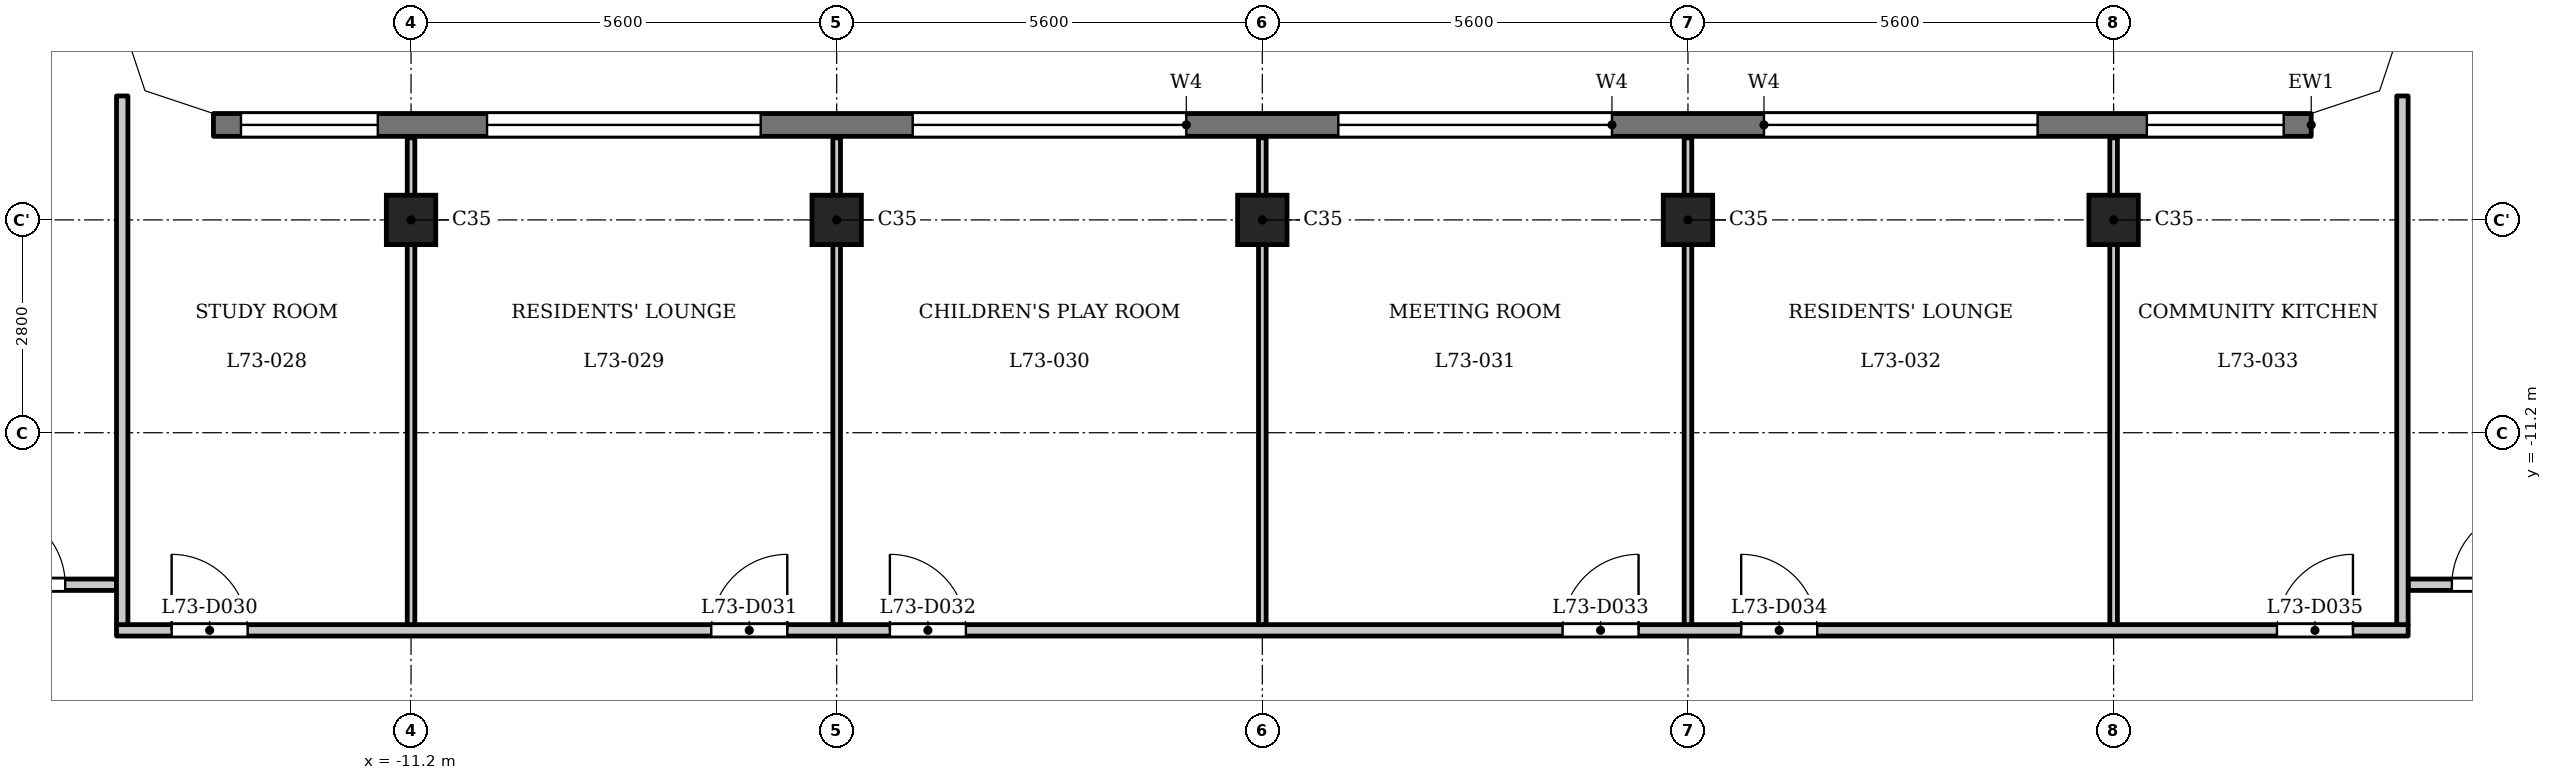
"""IFC4 building model, lengths in metres.
Left out: names, types, materials, properties, quantities, classifications, styles, units other than length and angle.
Written with IfcOpenShell. Run it as: python <this file> out.ifc"""

import sys

from ifc_helpers import new_model, si_unit, direction, frame, frame_2d, origin, origin_2d, place, context, subcontext, project, spatial, polyline, rectangle, outline, extrude, element, fill, save


model = new_model("IFC4")
c1 = context("Model", 3, precision=1e-05, world=origin(), true_north=direction((0.0, 1.0)))
c2 = subcontext(c1, "Body", "Model", "MODEL_VIEW")
j1 = project(units=[si_unit("LENGTHUNIT", "METRE"), si_unit("PLANEANGLEUNIT", "RADIAN")], contexts=[c1])
p1 = place(None, origin())
s1 = spatial("IfcSite", under=j1, at=p1, CompositionType="ELEMENT")
p2 = place(p1, origin())
s2 = spatial("IfcBuilding", under=s1, at=p2, CompositionType="ELEMENT")
p3 = place(p2, frame((0.0, 0.0, 280.2)))
s3 = spatial("IfcBuildingStorey", under=s2, at=p3, CompositionType="ELEMENT", Elevation=280.2)
for number, where, z_axis, x_axis in (
    (1, (-11.2, -8.4, 0.0), (0.0, 0.0, 1.0), (1.0, 0.0, 0.0)),
    (2, (-5.6, -8.4, 0.0), (0.0, 0.0, 1.0), (1.0, 0.0, 0.0)),
    (3, (0.0, -8.4, 0.0), (0.0, 0.0, 1.0), (1.0, 0.0, 0.0)),
    (4, (5.6, -8.4, 0.0), (0.0, 0.0, 1.0), (1.0, 0.0, 0.0)),
    (5, (11.2, -8.4, 0.0), (0.0, 0.0, 1.0), (1.0, 0.0, 0.0)),
):
    element("IfcColumn", number, at=place(p3, frame(where, z_axis=z_axis, x_axis=x_axis)), inside=s3, PredefinedType="COLUMN", context=c2, shape_type="SweptSolid", body=[
        extrude(rectangle(XDim=0.65, YDim=0.65, at=origin_2d()), origin(), (0.0, 0.0, 1.0), 3.5),
    ])
p4 = place(p3, frame((13.8, -7.15, 0.0), z_axis=(0.0, 0.0, 1.0), x_axis=(-1.0, 0.0, 0.0)))
e6 = element("IfcWall", 6, at=p4, inside=s3, PredefinedType="SOLIDWALL", context=c2, shape_type="SweptSolid", body=[
    extrude(rectangle(XDim=27.6, YDim=0.3, at=frame_2d((13.8, 0.0))), origin(), (0.0, 0.0, 1.0), 3.15),
])
p5 = place(p4, frame((0.363, 0.0, 0.9)))
e7 = element("IfcOpeningElement", 7, at=p5, cuts=e6, PredefinedType="OPENING", context=c2, shape_type="SweptSolid", body=[
    extrude(rectangle(XDim=1.8, YDim=1.25, at=frame_2d((0.9, 0.625))), frame((0.0, 0.16, 0.0), z_axis=(0.0, -1.0, 0.0), x_axis=(1.0, 0.0, 0.0)), (0.0, 0.0, 1.0), 0.32),
])
p6 = place(p4, frame((3.6, 0.0, 1.2)))
e8 = element("IfcOpeningElement", 8, at=p6, cuts=e6, PredefinedType="OPENING", context=c2, shape_type="SweptSolid", body=[
    extrude(rectangle(XDim=3.6, YDim=0.95, at=frame_2d((1.8, 0.475))), frame((0.0, 0.16, 0.0), z_axis=(0.0, -1.0, 0.0), x_axis=(1.0, 0.0, 0.0)), (0.0, 0.0, 1.0), 0.32),
])
p7 = place(p4, frame((9.2, 0.0, 1.2)))
e9 = element("IfcOpeningElement", 9, at=p7, cuts=e6, PredefinedType="OPENING", context=c2, shape_type="SweptSolid", body=[
    extrude(rectangle(XDim=3.6, YDim=0.95, at=frame_2d((1.8, 0.475))), frame((0.0, 0.16, 0.0), z_axis=(0.0, -1.0, 0.0), x_axis=(1.0, 0.0, 0.0)), (0.0, 0.0, 1.0), 0.32),
])
p8 = place(p4, frame((14.8, 0.0, 1.2)))
e10 = element("IfcOpeningElement", 10, at=p8, cuts=e6, PredefinedType="OPENING", context=c2, shape_type="SweptSolid", body=[
    extrude(rectangle(XDim=3.6, YDim=0.95, at=frame_2d((1.8, 0.475))), frame((0.0, 0.16, 0.0), z_axis=(0.0, -1.0, 0.0), x_axis=(1.0, 0.0, 0.0)), (0.0, 0.0, 1.0), 0.32),
])
p9 = place(p4, frame((20.4, 0.0, 1.2)))
e11 = element("IfcOpeningElement", 11, at=p9, cuts=e6, PredefinedType="OPENING", context=c2, shape_type="SweptSolid", body=[
    extrude(rectangle(XDim=3.6, YDim=0.95, at=frame_2d((1.8, 0.475))), frame((0.0, 0.16, 0.0), z_axis=(0.0, -1.0, 0.0), x_axis=(1.0, 0.0, 0.0)), (0.0, 0.0, 1.0), 0.32),
])
p10 = place(p4, frame((25.438, 0.0, 0.9)))
e12 = element("IfcOpeningElement", 12, at=p10, cuts=e6, PredefinedType="OPENING", context=c2, shape_type="SweptSolid", body=[
    extrude(rectangle(XDim=1.8, YDim=1.25, at=frame_2d((0.9, 0.625))), frame((0.0, 0.16, 0.0), z_axis=(0.0, -1.0, 0.0), x_axis=(1.0, 0.0, 0.0)), (0.0, 0.0, 1.0), 0.32),
])
p11 = place(p3, frame((-15.075, -13.8, 0.0), z_axis=(0.0, 0.0, 1.0), x_axis=(1.0, 0.0, 0.0)))
e13 = element("IfcWall", 13, at=p11, inside=s3, PredefinedType="PARTITIONING", context=c2, shape_type="SweptSolid", body=[
    extrude(rectangle(XDim=30.15, YDim=0.15, at=frame_2d((15.075, 0.0))), origin(), (0.0, 0.0, 1.0), 3.15),
])
p12 = place(p11, frame((0.725, 0.0, 0.0)))
e14 = element("IfcOpeningElement", 14, at=p12, cuts=e13, PredefinedType="OPENING", context=c2, shape_type="SweptSolid", body=[
    extrude(rectangle(XDim=1.0, YDim=2.1, at=frame_2d((0.5, 1.05))), frame((0.0, 0.085, 0.0), z_axis=(0.0, -1.0, 0.0), x_axis=(1.0, 0.0, 0.0)), (0.0, 0.0, 1.0), 0.17),
])
p13 = place(p11, frame((7.825, 0.0, 0.0)))
e15 = element("IfcOpeningElement", 15, at=p13, cuts=e13, PredefinedType="OPENING", context=c2, shape_type="SweptSolid", body=[
    extrude(rectangle(XDim=1.0, YDim=2.1, at=frame_2d((0.5, 1.05))), frame((0.0, 0.085, 0.0), z_axis=(0.0, -1.0, 0.0), x_axis=(1.0, 0.0, 0.0)), (0.0, 0.0, 1.0), 0.17),
])
p14 = place(p11, frame((10.175, 0.0, 0.0)))
e16 = element("IfcOpeningElement", 16, at=p14, cuts=e13, PredefinedType="OPENING", context=c2, shape_type="SweptSolid", body=[
    extrude(rectangle(XDim=1.0, YDim=2.1, at=frame_2d((0.5, 1.05))), frame((0.0, 0.085, 0.0), z_axis=(0.0, -1.0, 0.0), x_axis=(1.0, 0.0, 0.0)), (0.0, 0.0, 1.0), 0.17),
])
p15 = place(p11, frame((19.025, 0.0, 0.0)))
e17 = element("IfcOpeningElement", 17, at=p15, cuts=e13, PredefinedType="OPENING", context=c2, shape_type="SweptSolid", body=[
    extrude(rectangle(XDim=1.0, YDim=2.1, at=frame_2d((0.5, 1.05))), frame((0.0, 0.085, 0.0), z_axis=(0.0, -1.0, 0.0), x_axis=(1.0, 0.0, 0.0)), (0.0, 0.0, 1.0), 0.17),
])
p16 = place(p11, frame((21.375, 0.0, 0.0)))
e18 = element("IfcOpeningElement", 18, at=p16, cuts=e13, PredefinedType="OPENING", context=c2, shape_type="SweptSolid", body=[
    extrude(rectangle(XDim=1.0, YDim=2.1, at=frame_2d((0.5, 1.05))), frame((0.0, 0.085, 0.0), z_axis=(0.0, -1.0, 0.0), x_axis=(1.0, 0.0, 0.0)), (0.0, 0.0, 1.0), 0.17),
])
p17 = place(p11, frame((28.424, 0.0, 0.0)))
e19 = element("IfcOpeningElement", 19, at=p17, cuts=e13, PredefinedType="OPENING", context=c2, shape_type="SweptSolid", body=[
    extrude(rectangle(XDim=1.0, YDim=2.1, at=frame_2d((0.5, 1.05))), frame((0.0, 0.085, 0.0), z_axis=(0.0, -1.0, 0.0), x_axis=(1.0, 0.0, 0.0)), (0.0, 0.0, 1.0), 0.17),
])
p18 = place(p3, frame((-17.4, -13.2, 0.0), z_axis=(0.0, 0.0, 1.0), x_axis=(1.0, 0.0, 0.0)))
e20 = element("IfcWall", 20, at=p18, inside=s3, PredefinedType="PARTITIONING", context=c2, shape_type="SweptSolid", body=[
    extrude(rectangle(XDim=2.325, YDim=0.15, at=frame_2d((1.163, 0.0))), origin(), (0.0, 0.0, 1.0), 3.15),
])
p19 = place(p18, frame((0.65, 0.0, 0.0)))
e21 = element("IfcOpeningElement", 21, at=p19, cuts=e20, PredefinedType="OPENING", context=c2, shape_type="SweptSolid", body=[
    extrude(rectangle(XDim=1.0, YDim=2.1, at=frame_2d((0.5, 1.05))), frame((0.0, 0.085, 0.0), z_axis=(0.0, -1.0, 0.0), x_axis=(1.0, 0.0, 0.0)), (0.0, 0.0, 1.0), 0.17),
])
p20 = place(p3, frame((15.075, -13.2, 0.0), z_axis=(0.0, 0.0, 1.0), x_axis=(1.0, 0.0, 0.0)))
e22 = element("IfcWall", 22, at=p20, inside=s3, PredefinedType="PARTITIONING", context=c2, shape_type="SweptSolid", body=[
    extrude(rectangle(XDim=2.325, YDim=0.15, at=frame_2d((1.163, 0.0))), origin(), (0.0, 0.0, 1.0), 3.15),
])
p21 = place(p20, frame((0.575, 0.0, 0.0)))
e23 = element("IfcOpeningElement", 23, at=p21, cuts=e22, PredefinedType="OPENING", context=c2, shape_type="SweptSolid", body=[
    extrude(rectangle(XDim=1.0, YDim=2.1, at=frame_2d((0.5, 1.05))), frame((0.0, 0.085, 0.0), z_axis=(0.0, -1.0, 0.0), x_axis=(1.0, 0.0, 0.0)), (0.0, 0.0, 1.0), 0.17),
])
p22 = place(p3, frame((-15.0, -13.725, 0.0), z_axis=(0.0, 0.0, 1.0), x_axis=(0.0, 1.0, 0.0)))
e24 = element("IfcWall", 24, at=p22, inside=s3, PredefinedType="PARTITIONING", context=c2, shape_type="SweptSolid", body=[
    extrude(rectangle(XDim=6.956, YDim=0.15, at=frame_2d((3.478, 0.0))), origin(), (0.0, 0.0, 1.0), 3.15),
])
for number, where, z_axis, x_axis in (
    (25, (-11.2, -13.725, 0.0), (0.0, 0.0, 1.0), (0.0, 1.0, 0.0)),
    (26, (-5.6, -13.725, 0.0), (0.0, 0.0, 1.0), (0.0, 1.0, 0.0)),
    (27, (0.0, -13.725, 0.0), (0.0, 0.0, 1.0), (0.0, 1.0, 0.0)),
    (28, (5.6, -13.725, 0.0), (0.0, 0.0, 1.0), (0.0, 1.0, 0.0)),
    (29, (11.2, -13.725, 0.0), (0.0, 0.0, 1.0), (0.0, 1.0, 0.0)),
):
    element("IfcWall", number, at=place(p3, frame(where, z_axis=z_axis, x_axis=x_axis)), inside=s3, PredefinedType="PARTITIONING", context=c2, shape_type="SweptSolid", body=[
        extrude(rectangle(XDim=6.405, YDim=0.1, at=frame_2d((3.203, 0.0))), origin(), (0.0, 0.0, 1.0), 3.15),
    ])
p23 = place(p3, frame((15.0, -13.725, 0.0), z_axis=(0.0, 0.0, 1.0), x_axis=(0.0, 1.0, 0.0)))
e30 = element("IfcWall", 30, at=p23, inside=s3, PredefinedType="PARTITIONING", context=c2, shape_type="SweptSolid", body=[
    extrude(rectangle(XDim=6.956, YDim=0.15, at=frame_2d((3.478, 0.0))), origin(), (0.0, 0.0, 1.0), 3.15),
])
p24 = place(p3, origin())
e31 = element("IfcWall", 31, at=p24, inside=s3, PredefinedType="SOLIDWALL", context=c2, shape_type="SweptSolid", body=[
    extrude(outline(polyline([(14.937, -6.937), (15.3, -5.849), (15.3, -5.8), (15.0, -5.8), (14.7, -6.7), (13.8, -7.0), (13.8, -7.3), (13.849, -7.3), (14.937, -6.937)])), origin(), (0.0, 0.0, 1.0), 3.15),
])
e32 = element("IfcWall", 32, at=p24, inside=s3, PredefinedType="SOLIDWALL", context=c2, shape_type="SweptSolid", body=[
    extrude(outline(polyline([(-14.937, -6.937), (-13.849, -7.3), (-13.8, -7.3), (-13.8, -7.0), (-14.7, -6.7), (-15.0, -5.8), (-15.3, -5.8), (-15.3, -5.849), (-14.937, -6.937)])), origin(), (0.0, 0.0, 1.0), 3.15),
])
p25 = place(p19, origin())
e33 = element("IfcDoor", 33, at=p25, inside=s3, OperationType="SINGLE_SWING_RIGHT", PredefinedType="DOOR", context=c2, shape_type="SweptSolid", body=[
    extrude(rectangle(XDim=1.0, YDim=2.1, at=frame_2d((0.5, 1.05))), frame((0.0, 0.025, 0.0), z_axis=(0.0, -1.0, 0.0), x_axis=(1.0, 0.0, 0.0)), (0.0, 0.0, 1.0), 0.05),
])
fill(e21, e33)
p26 = place(p21, origin())
e34 = element("IfcDoor", 34, at=p26, inside=s3, OperationType="SINGLE_SWING_LEFT", PredefinedType="DOOR", context=c2, shape_type="SweptSolid", body=[
    extrude(rectangle(XDim=1.0, YDim=2.1, at=frame_2d((0.5, 1.05))), frame((0.0, 0.025, 0.0), z_axis=(0.0, -1.0, 0.0), x_axis=(1.0, 0.0, 0.0)), (0.0, 0.0, 1.0), 0.05),
])
fill(e23, e34)
p27 = place(p12, origin())
e35 = element("IfcDoor", 35, at=p27, inside=s3, OperationType="SINGLE_SWING_RIGHT", PredefinedType="DOOR", context=c2, shape_type="SweptSolid", body=[
    extrude(rectangle(XDim=1.0, YDim=2.1, at=frame_2d((0.5, 1.05))), frame((0.0, 0.025, 0.0), z_axis=(0.0, -1.0, 0.0), x_axis=(1.0, 0.0, 0.0)), (0.0, 0.0, 1.0), 0.05),
])
fill(e14, e35)
p28 = place(p13, origin())
e36 = element("IfcDoor", 36, at=p28, inside=s3, OperationType="SINGLE_SWING_LEFT", PredefinedType="DOOR", context=c2, shape_type="SweptSolid", body=[
    extrude(rectangle(XDim=1.0, YDim=2.1, at=frame_2d((0.5, 1.05))), frame((0.0, 0.025, 0.0), z_axis=(0.0, -1.0, 0.0), x_axis=(1.0, 0.0, 0.0)), (0.0, 0.0, 1.0), 0.05),
])
fill(e15, e36)
p29 = place(p14, origin())
e37 = element("IfcDoor", 37, at=p29, inside=s3, OperationType="SINGLE_SWING_RIGHT", PredefinedType="DOOR", context=c2, shape_type="SweptSolid", body=[
    extrude(rectangle(XDim=1.0, YDim=2.1, at=frame_2d((0.5, 1.05))), frame((0.0, 0.025, 0.0), z_axis=(0.0, -1.0, 0.0), x_axis=(1.0, 0.0, 0.0)), (0.0, 0.0, 1.0), 0.05),
])
fill(e16, e37)
p30 = place(p15, origin())
e38 = element("IfcDoor", 38, at=p30, inside=s3, OperationType="SINGLE_SWING_LEFT", PredefinedType="DOOR", context=c2, shape_type="SweptSolid", body=[
    extrude(rectangle(XDim=1.0, YDim=2.1, at=frame_2d((0.5, 1.05))), frame((0.0, 0.025, 0.0), z_axis=(0.0, -1.0, 0.0), x_axis=(1.0, 0.0, 0.0)), (0.0, 0.0, 1.0), 0.05),
])
fill(e17, e38)
p31 = place(p16, origin())
e39 = element("IfcDoor", 39, at=p31, inside=s3, OperationType="SINGLE_SWING_RIGHT", PredefinedType="DOOR", context=c2, shape_type="SweptSolid", body=[
    extrude(rectangle(XDim=1.0, YDim=2.1, at=frame_2d((0.5, 1.05))), frame((0.0, 0.025, 0.0), z_axis=(0.0, -1.0, 0.0), x_axis=(1.0, 0.0, 0.0)), (0.0, 0.0, 1.0), 0.05),
])
fill(e18, e39)
p32 = place(p17, origin())
e40 = element("IfcDoor", 40, at=p32, inside=s3, OperationType="SINGLE_SWING_LEFT", PredefinedType="DOOR", context=c2, shape_type="SweptSolid", body=[
    extrude(rectangle(XDim=1.0, YDim=2.1, at=frame_2d((0.5, 1.05))), frame((0.0, 0.025, 0.0), z_axis=(0.0, -1.0, 0.0), x_axis=(1.0, 0.0, 0.0)), (0.0, 0.0, 1.0), 0.05),
])
fill(e19, e40)
p33 = place(p5, origin())
e41 = element("IfcWindow", 41, at=p33, inside=s3, PartitioningType="SINGLE_PANEL", PredefinedType="WINDOW", context=c2, shape_type="SweptSolid", body=[
    extrude(rectangle(XDim=1.8, YDim=1.25, at=frame_2d((0.9, 0.625))), frame((0.0, 0.03, 0.0), z_axis=(0.0, -1.0, 0.0), x_axis=(1.0, 0.0, 0.0)), (0.0, 0.0, 1.0), 0.06),
])
fill(e7, e41)
p34 = place(p6, origin())
e42 = element("IfcWindow", 42, at=p34, inside=s3, PartitioningType="SINGLE_PANEL", PredefinedType="WINDOW", context=c2, shape_type="SweptSolid", body=[
    extrude(rectangle(XDim=3.6, YDim=0.95, at=frame_2d((1.8, 0.475))), frame((0.0, 0.03, 0.0), z_axis=(0.0, -1.0, 0.0), x_axis=(1.0, 0.0, 0.0)), (0.0, 0.0, 1.0), 0.06),
])
fill(e8, e42)
p35 = place(p7, origin())
e43 = element("IfcWindow", 43, at=p35, inside=s3, PartitioningType="SINGLE_PANEL", PredefinedType="WINDOW", context=c2, shape_type="SweptSolid", body=[
    extrude(rectangle(XDim=3.6, YDim=0.95, at=frame_2d((1.8, 0.475))), frame((0.0, 0.03, 0.0), z_axis=(0.0, -1.0, 0.0), x_axis=(1.0, 0.0, 0.0)), (0.0, 0.0, 1.0), 0.06),
])
fill(e9, e43)
p36 = place(p8, origin())
e44 = element("IfcWindow", 44, at=p36, inside=s3, PartitioningType="SINGLE_PANEL", PredefinedType="WINDOW", context=c2, shape_type="SweptSolid", body=[
    extrude(rectangle(XDim=3.6, YDim=0.95, at=frame_2d((1.8, 0.475))), frame((0.0, 0.03, 0.0), z_axis=(0.0, -1.0, 0.0), x_axis=(1.0, 0.0, 0.0)), (0.0, 0.0, 1.0), 0.06),
])
fill(e10, e44)
p37 = place(p9, origin())
e45 = element("IfcWindow", 45, at=p37, inside=s3, PartitioningType="SINGLE_PANEL", PredefinedType="WINDOW", context=c2, shape_type="SweptSolid", body=[
    extrude(rectangle(XDim=3.6, YDim=0.95, at=frame_2d((1.8, 0.475))), frame((0.0, 0.03, 0.0), z_axis=(0.0, -1.0, 0.0), x_axis=(1.0, 0.0, 0.0)), (0.0, 0.0, 1.0), 0.06),
])
fill(e11, e45)
p38 = place(p10, origin())
e46 = element("IfcWindow", 46, at=p38, inside=s3, PartitioningType="SINGLE_PANEL", PredefinedType="WINDOW", context=c2, shape_type="SweptSolid", body=[
    extrude(rectangle(XDim=1.8, YDim=1.25, at=frame_2d((0.9, 0.625))), frame((0.0, 0.03, 0.0), z_axis=(0.0, -1.0, 0.0), x_axis=(1.0, 0.0, 0.0)), (0.0, 0.0, 1.0), 0.06),
])
fill(e12, e46)
save(model, sys.argv[1])
